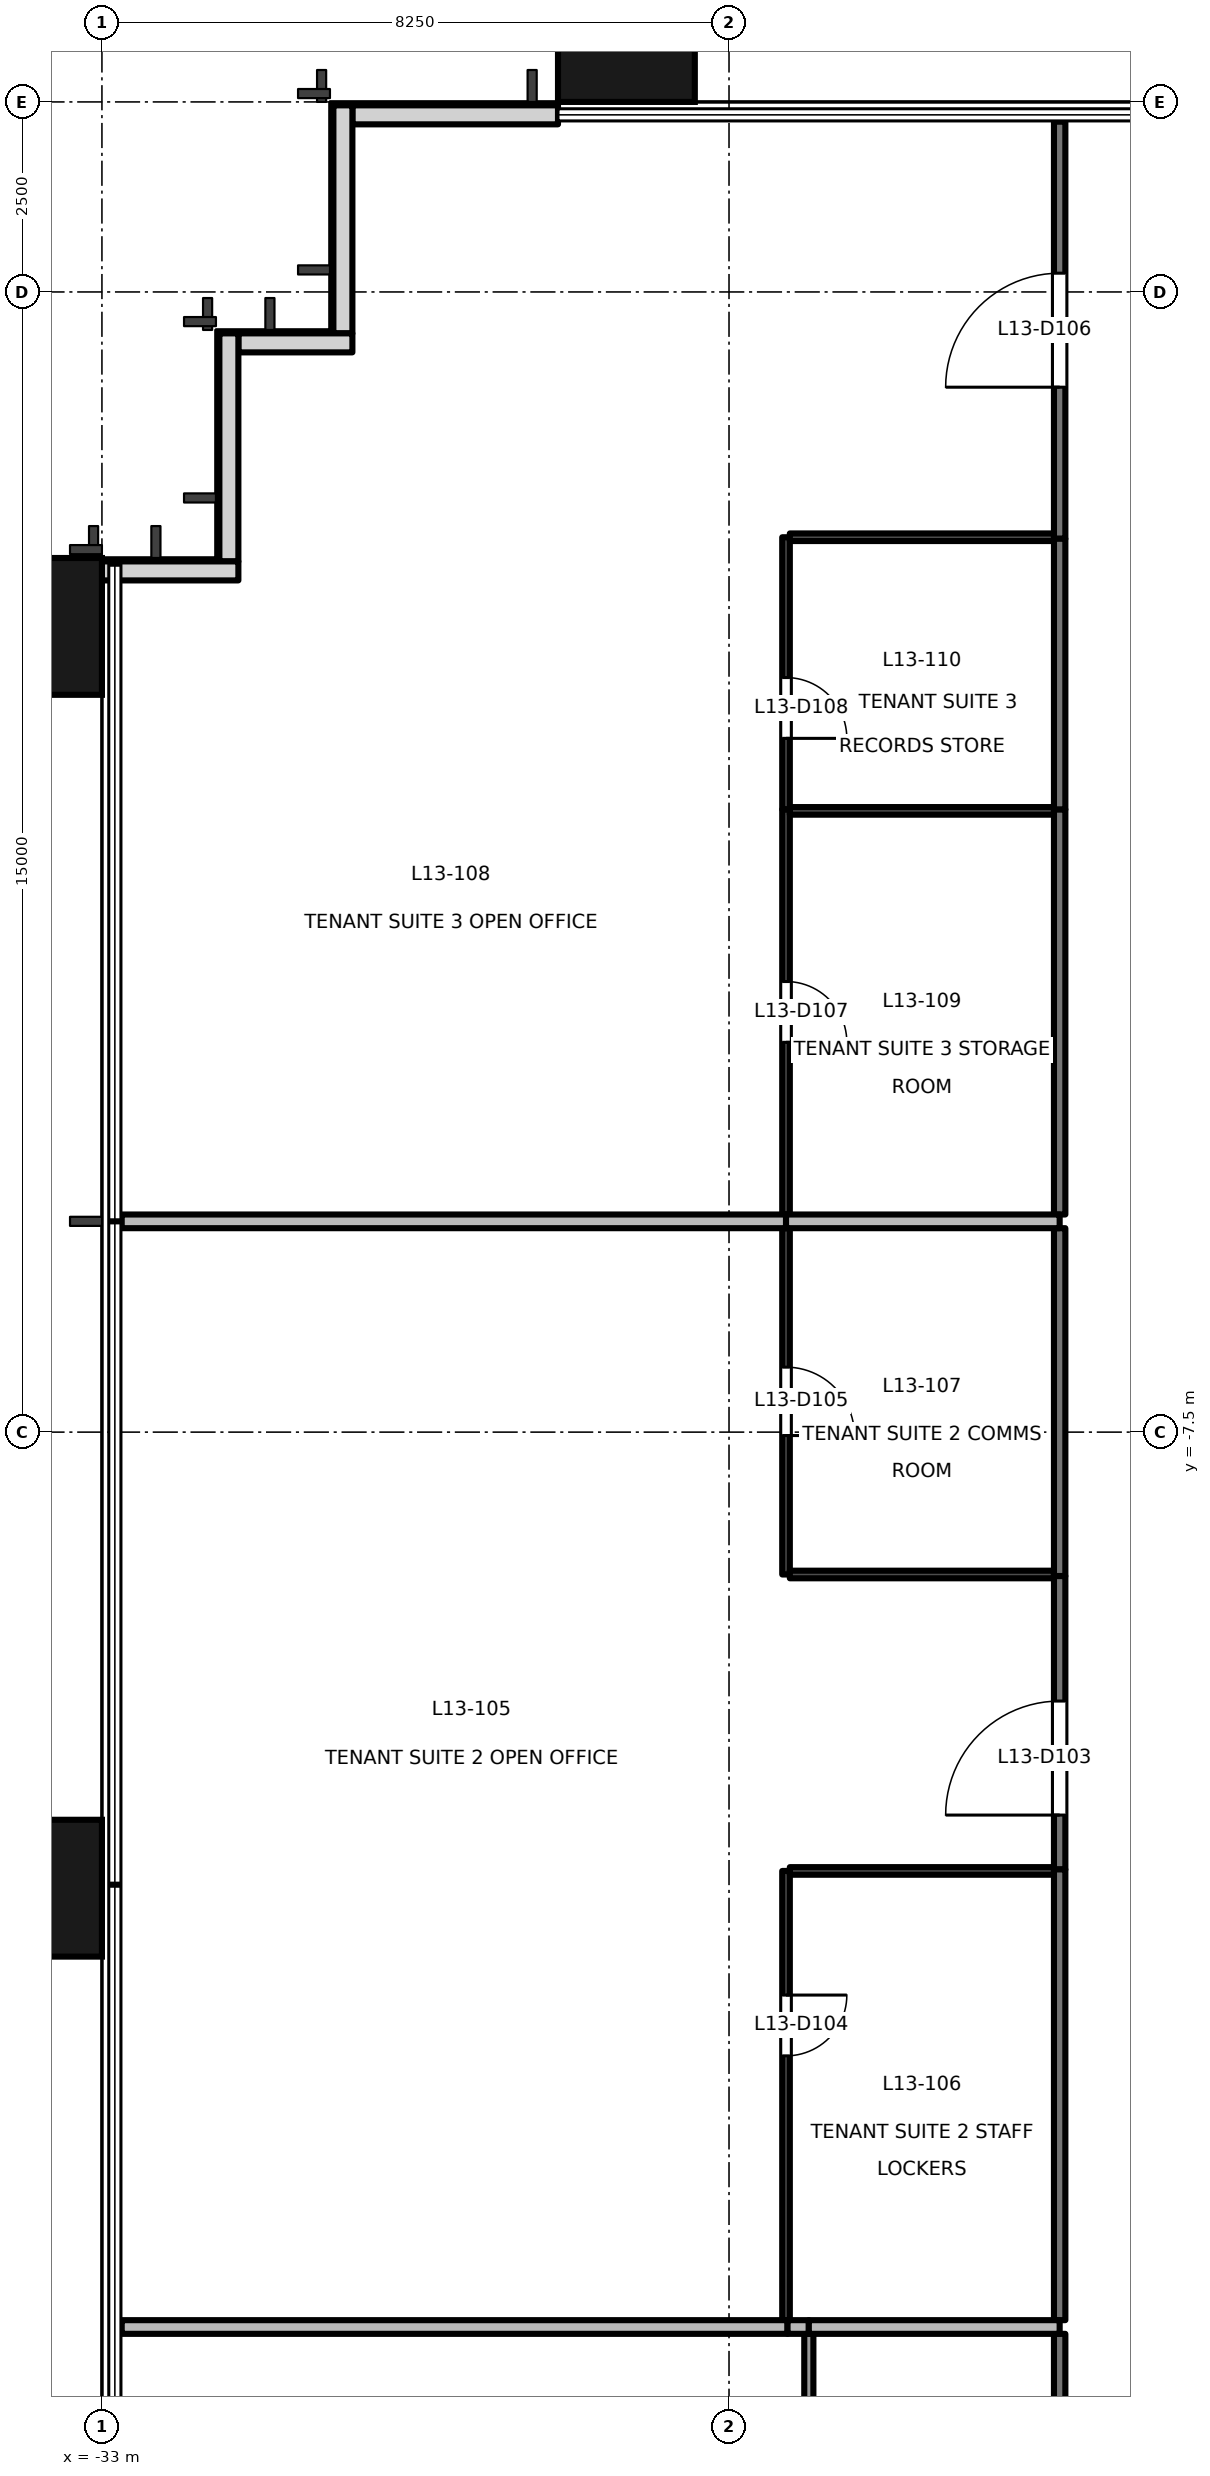
"""IFC4 building model, lengths in metres.
Left out: names, types, materials, properties, quantities, classifications, styles, units other than length and angle.
Written with IfcOpenShell. Run it as: python <this file> out.ifc"""

import sys

from ifc_helpers import new_model, si_unit, direction, frame, frame_2d, origin, origin_2d, place, context, subcontext, project, spatial, rectangle, extrude, element, fill, save


model = new_model("IFC4")
c1 = context("Model", 3, precision=1e-05, world=origin(), true_north=direction((0.0, 1.0)))
c2 = subcontext(c1, "Body", "Model", "MODEL_VIEW")
j1 = project(units=[si_unit("LENGTHUNIT", "METRE"), si_unit("PLANEANGLEUNIT", "RADIAN")], contexts=[c1])
p1 = place(None, origin())
s1 = spatial("IfcSite", under=j1, at=p1, CompositionType="ELEMENT")
p2 = place(p1, origin())
s2 = spatial("IfcBuilding", under=s1, at=p2, CompositionType="ELEMENT")
p3 = place(p2, frame((0.0, 0.0, 61.1)))
s3 = spatial("IfcBuildingStorey", under=s2, at=p3, CompositionType="ELEMENT", Elevation=61.1)
for number, where, z_axis, x_axis in (
    (1, (-33.9, -13.5, -0.2), (0.0, 0.0, 1.0), (0.0, 1.0, 0.0)),
    (2, (-33.9, 3.1, -0.2), (0.0, 0.0, 1.0), (0.0, 1.0, 0.0)),
    (3, (-26.1, 10.9, -0.2), (0.0, 0.0, 1.0), (1.0, 0.0, 0.0)),
):
    element("IfcColumn", number, at=place(p3, frame(where, z_axis=z_axis, x_axis=x_axis)), inside=s3, PredefinedType="COLUMN", context=c2, shape_type="SweptSolid", body=[
        extrude(rectangle(XDim=1.8, YDim=1.8, at=origin_2d()), origin(), (0.0, 0.0, 1.0), 4.1),
    ])
p4 = place(p3, frame((-27.0, 9.83, 0.0), z_axis=(0.0, 0.0, 1.0), x_axis=(-1.0, 0.0, 0.0)))
e4 = element("IfcWall", 4, at=p4, inside=s3, PredefinedType="SOLIDWALL", context=c2, shape_type="SweptSolid", body=[
    extrude(rectangle(XDim=2.705, YDim=0.25, at=frame_2d((1.353, 0.0))), origin(), (0.0, 0.0, 1.0), 3.9),
])
p5 = place(p3, frame((-29.83, 9.955, 0.0), z_axis=(0.0, 0.0, 1.0), x_axis=(0.0, -1.0, 0.0)))
e5 = element("IfcWall", 5, at=p5, inside=s3, PredefinedType="SOLIDWALL", context=c2, shape_type="SweptSolid", body=[
    extrude(rectangle(XDim=3.0, YDim=0.25, at=frame_2d((1.5, 0.0))), origin(), (0.0, 0.0, 1.0), 3.9),
])
p6 = place(p3, frame((-29.705, 6.83, 0.0), z_axis=(0.0, 0.0, 1.0), x_axis=(-1.0, 0.0, 0.0)))
e6 = element("IfcWall", 6, at=p6, inside=s3, PredefinedType="SOLIDWALL", context=c2, shape_type="SweptSolid", body=[
    extrude(rectangle(XDim=1.5, YDim=0.25, at=frame_2d((0.75, 0.0))), origin(), (0.0, 0.0, 1.0), 3.9),
])
p7 = place(p3, frame((-31.33, 6.955, 0.0), z_axis=(0.0, 0.0, 1.0), x_axis=(0.0, -1.0, 0.0)))
e7 = element("IfcWall", 7, at=p7, inside=s3, PredefinedType="SOLIDWALL", context=c2, shape_type="SweptSolid", body=[
    extrude(rectangle(XDim=3.0, YDim=0.25, at=frame_2d((1.5, 0.0))), origin(), (0.0, 0.0, 1.0), 3.9),
])
p8 = place(p3, frame((-31.205, 3.83, 0.0), z_axis=(0.0, 0.0, 1.0), x_axis=(-1.0, 0.0, 0.0)))
e8 = element("IfcWall", 8, at=p8, inside=s3, PredefinedType="SOLIDWALL", context=c2, shape_type="SweptSolid", body=[
    extrude(rectangle(XDim=1.8, YDim=0.25, at=frame_2d((0.9, 0.0))), origin(), (0.0, 0.0, 1.0), 3.9),
])
p9 = place(p3, frame((-20.4, -26.18, 0.0), z_axis=(0.0, 0.0, 1.0), x_axis=(0.0, 1.0, 0.0)))
e9 = element("IfcWall", 9, at=p9, inside=s3, PredefinedType="PARTITIONING", context=c2, shape_type="SweptSolid", body=[
    extrude(rectangle(XDim=6.817, YDim=0.15, at=frame_2d((3.408, 0.0))), origin(), (0.0, 0.0, 1.0), 3.3),
])
p10 = place(p3, frame((-20.4, -13.253, 0.0), z_axis=(0.0, 0.0, 1.0), x_axis=(0.0, 1.0, 0.0)))
e10 = element("IfcWall", 10, at=p10, inside=s3, PredefinedType="PARTITIONING", context=c2, shape_type="SweptSolid", body=[
    extrude(rectangle(XDim=3.86, YDim=0.15, at=frame_2d((1.93, 0.0))), origin(), (0.0, 0.0, 1.0), 3.9),
])
p11 = place(p10, frame((0.715, 0.0, 0.0)))
e11 = element("IfcOpeningElement", 11, at=p11, cuts=e10, PredefinedType="OPENING", context=c2, shape_type="SweptSolid", body=[
    extrude(rectangle(XDim=1.5, YDim=2.1, at=frame_2d((0.75, 1.05))), frame((0.0, 0.085, 0.0), z_axis=(0.0, -1.0, 0.0), x_axis=(1.0, 0.0, 0.0)), (0.0, 0.0, 1.0), 0.171),
])
p12 = place(p3, frame((-20.4, -19.183, 0.0), z_axis=(0.0, 0.0, 1.0), x_axis=(0.0, 1.0, 0.0)))
e12 = element("IfcWall", 12, at=p12, inside=s3, PredefinedType="PARTITIONING", context=c2, shape_type="SweptSolid", body=[
    extrude(rectangle(XDim=5.93, YDim=0.15, at=frame_2d((2.965, 0.0))), origin(), (0.0, 0.0, 1.0), 3.3),
])
p13 = place(p3, frame((-20.4, -9.393, 0.0), z_axis=(0.0, 0.0, 1.0), x_axis=(0.0, 1.0, 0.0)))
e13 = element("IfcWall", 13, at=p13, inside=s3, PredefinedType="PARTITIONING", context=c2, shape_type="SweptSolid", body=[
    extrude(rectangle(XDim=4.576, YDim=0.15, at=frame_2d((2.288, 0.0))), origin(), (0.0, 0.0, 1.0), 3.3),
])
p14 = place(p3, frame((-20.4, 4.253, 0.0), z_axis=(0.0, 0.0, 1.0), x_axis=(0.0, 1.0, 0.0)))
e14 = element("IfcWall", 14, at=p14, inside=s3, PredefinedType="PARTITIONING", context=c2, shape_type="SweptSolid", body=[
    extrude(rectangle(XDim=5.487, YDim=0.15, at=frame_2d((2.744, 0.0))), origin(), (0.0, 0.0, 1.0), 3.9),
])
p15 = place(p14, frame((1.994, 0.0, 0.0)))
e15 = element("IfcOpeningElement", 15, at=p15, cuts=e14, PredefinedType="OPENING", context=c2, shape_type="SweptSolid", body=[
    extrude(rectangle(XDim=1.5, YDim=2.1, at=frame_2d((0.75, 1.05))), frame((0.0, 0.085, 0.0), z_axis=(0.0, -1.0, 0.0), x_axis=(1.0, 0.0, 0.0)), (0.0, 0.0, 1.0), 0.171),
])
p16 = place(p3, frame((-20.4, -4.637, 0.0), z_axis=(0.0, 0.0, 1.0), x_axis=(0.0, 1.0, 0.0)))
e16 = element("IfcWall", 16, at=p16, inside=s3, PredefinedType="PARTITIONING", context=c2, shape_type="SweptSolid", body=[
    extrude(rectangle(XDim=5.33, YDim=0.15, at=frame_2d((2.665, 0.0))), origin(), (0.0, 0.0, 1.0), 3.3),
])
p17 = place(p3, frame((-20.4, 0.693, 0.0), z_axis=(0.0, 0.0, 1.0), x_axis=(0.0, 1.0, 0.0)))
e17 = element("IfcWall", 17, at=p17, inside=s3, PredefinedType="PARTITIONING", context=c2, shape_type="SweptSolid", body=[
    extrude(rectangle(XDim=3.56, YDim=0.15, at=frame_2d((1.78, 0.0))), origin(), (0.0, 0.0, 1.0), 3.9),
])
p18 = place(p3, frame((-23.7, -19.363, 0.0), z_axis=(0.0, 0.0, 1.0), x_axis=(0.0, -1.0, 0.0)))
e18 = element("IfcWall", 18, at=p18, inside=s3, PredefinedType="PARTITIONING", context=c2, shape_type="SweptSolid", body=[
    extrude(rectangle(XDim=6.797, YDim=0.12, at=frame_2d((3.398, 0.0))), origin(), (0.0, 0.0, 1.0), 3.3),
])
p19 = place(p18, frame((1.869, 0.0, 0.0)))
e19 = element("IfcOpeningElement", 19, at=p19, cuts=e18, PredefinedType="OPENING", context=c2, shape_type="SweptSolid", body=[
    extrude(rectangle(XDim=0.9, YDim=2.1, at=frame_2d((0.45, 1.05))), frame((0.0, 0.071, 0.0), z_axis=(0.0, -1.0, 0.0), x_axis=(1.0, 0.0, 0.0)), (0.0, 0.0, 1.0), 0.141),
])
p20 = place(p3, frame((-32.74, -19.273, 0.0), z_axis=(0.0, 0.0, 1.0), x_axis=(1.0, 0.0, 0.0)))
e20 = element("IfcWall", 20, at=p20, inside=s3, PredefinedType="PARTITIONING", context=c2, shape_type="SweptSolid", body=[
    extrude(rectangle(XDim=8.76, YDim=0.18, at=frame_2d((4.38, 0.0))), origin(), (0.0, 0.0, 1.0), 3.9),
])
p21 = place(p3, frame((-23.98, -19.273, 0.0), z_axis=(0.0, 0.0, 1.0), x_axis=(1.0, 0.0, 0.0)))
e21 = element("IfcWall", 21, at=p21, inside=s3, PredefinedType="PARTITIONING", context=c2, shape_type="SweptSolid", body=[
    extrude(rectangle(XDim=0.28, YDim=0.18, at=frame_2d((0.14, 0.0))), origin(), (0.0, 0.0, 1.0), 3.9),
])
p22 = place(p3, frame((-23.7, -19.273, 0.0), z_axis=(0.0, 0.0, 1.0), x_axis=(1.0, 0.0, 0.0)))
e22 = element("IfcWall", 22, at=p22, inside=s3, PredefinedType="PARTITIONING", context=c2, shape_type="SweptSolid", body=[
    extrude(rectangle(XDim=3.3, YDim=0.18, at=frame_2d((1.65, 0.0))), origin(), (0.0, 0.0, 1.0), 3.9),
])
p23 = place(p3, frame((-24.0, -13.273, 0.0), z_axis=(0.0, 0.0, 1.0), x_axis=(0.0, -1.0, 0.0)))
e23 = element("IfcWall", 23, at=p23, inside=s3, PredefinedType="PARTITIONING", context=c2, shape_type="SweptSolid", body=[
    extrude(rectangle(XDim=5.91, YDim=0.1, at=frame_2d((2.955, 0.0))), origin(), (0.0, 0.0, 1.0), 3.3),
])
p24 = place(p23, frame((1.633, 0.0, 0.0)))
e24 = element("IfcOpeningElement", 24, at=p24, cuts=e23, PredefinedType="OPENING", context=c2, shape_type="SweptSolid", body=[
    extrude(rectangle(XDim=0.8, YDim=2.1, at=frame_2d((0.4, 1.05))), frame((0.0, 0.061, 0.0), z_axis=(0.0, -1.0, 0.0), x_axis=(1.0, 0.0, 0.0)), (0.0, 0.0, 1.0), 0.121),
])
p25 = place(p3, frame((-20.475, -13.273, 0.0), z_axis=(0.0, 0.0, 1.0), x_axis=(-1.0, 0.0, 0.0)))
e25 = element("IfcWall", 25, at=p25, inside=s3, PredefinedType="PARTITIONING", context=c2, shape_type="SweptSolid", body=[
    extrude(rectangle(XDim=3.475, YDim=0.1, at=frame_2d((1.737, 0.0))), origin(), (0.0, 0.0, 1.0), 3.9),
])
p26 = place(p3, frame((-24.0, -4.817, 0.0), z_axis=(0.0, 0.0, 1.0), x_axis=(0.0, -1.0, 0.0)))
e26 = element("IfcWall", 26, at=p26, inside=s3, PredefinedType="PARTITIONING", context=c2, shape_type="SweptSolid", body=[
    extrude(rectangle(XDim=4.556, YDim=0.1, at=frame_2d((2.278, 0.0))), origin(), (0.0, 0.0, 1.0), 3.3),
])
p27 = place(p26, frame((1.828, 0.0, 0.0)))
e27 = element("IfcOpeningElement", 27, at=p27, cuts=e26, PredefinedType="OPENING", context=c2, shape_type="SweptSolid", body=[
    extrude(rectangle(XDim=0.9, YDim=2.1, at=frame_2d((0.45, 1.05))), frame((0.0, 0.061, 0.0), z_axis=(0.0, -1.0, 0.0), x_axis=(1.0, 0.0, 0.0)), (0.0, 0.0, 1.0), 0.121),
])
p28 = place(p3, frame((-23.95, -9.373, 0.0), z_axis=(0.0, 0.0, 1.0), x_axis=(1.0, 0.0, 0.0)))
e28 = element("IfcWall", 28, at=p28, inside=s3, PredefinedType="PARTITIONING", context=c2, shape_type="SweptSolid", body=[
    extrude(rectangle(XDim=3.475, YDim=0.1, at=frame_2d((1.737, 0.0))), origin(), (0.0, 0.0, 1.0), 3.9),
])
p29 = place(p3, frame((-32.74, -4.727, 0.0), z_axis=(0.0, 0.0, 1.0), x_axis=(1.0, 0.0, 0.0)))
e29 = element("IfcWall", 29, at=p29, inside=s3, PredefinedType="PARTITIONING", context=c2, shape_type="SweptSolid", body=[
    extrude(rectangle(XDim=8.74, YDim=0.18, at=frame_2d((4.37, 0.0))), origin(), (0.0, 0.0, 1.0), 3.3),
])
p30 = place(p3, frame((-24.0, -4.727, 0.0), z_axis=(0.0, 0.0, 1.0), x_axis=(1.0, 0.0, 0.0)))
e30 = element("IfcWall", 30, at=p30, inside=s3, PredefinedType="PARTITIONING", context=c2, shape_type="SweptSolid", body=[
    extrude(rectangle(XDim=3.6, YDim=0.18, at=frame_2d((1.8, 0.0))), origin(), (0.0, 0.0, 1.0), 3.3),
])
p31 = place(p3, frame((-24.0, 0.693, 0.0), z_axis=(0.0, 0.0, 1.0), x_axis=(0.0, -1.0, 0.0)))
e31 = element("IfcWall", 31, at=p31, inside=s3, PredefinedType="PARTITIONING", context=c2, shape_type="SweptSolid", body=[
    extrude(rectangle(XDim=5.33, YDim=0.1, at=frame_2d((2.665, 0.0))), origin(), (0.0, 0.0, 1.0), 3.3),
])
p32 = place(p31, frame((2.265, 0.0, 0.0)))
e32 = element("IfcOpeningElement", 32, at=p32, cuts=e31, PredefinedType="OPENING", context=c2, shape_type="SweptSolid", body=[
    extrude(rectangle(XDim=0.8, YDim=2.1, at=frame_2d((0.4, 1.05))), frame((0.0, 0.061, 0.0), z_axis=(0.0, -1.0, 0.0), x_axis=(1.0, 0.0, 0.0)), (0.0, 0.0, 1.0), 0.121),
])
p33 = place(p3, frame((-24.0, 4.273, 0.0), z_axis=(0.0, 0.0, 1.0), x_axis=(0.0, -1.0, 0.0)))
e33 = element("IfcWall", 33, at=p33, inside=s3, PredefinedType="PARTITIONING", context=c2, shape_type="SweptSolid", body=[
    extrude(rectangle(XDim=3.58, YDim=0.1, at=frame_2d((1.79, 0.0))), origin(), (0.0, 0.0, 1.0), 3.9),
])
p34 = place(p33, frame((1.846, 0.0, 0.0)))
e34 = element("IfcOpeningElement", 34, at=p34, cuts=e33, PredefinedType="OPENING", context=c2, shape_type="SweptSolid", body=[
    extrude(rectangle(XDim=0.8, YDim=2.1, at=frame_2d((0.4, 1.05))), frame((0.0, 0.061, 0.0), z_axis=(0.0, -1.0, 0.0), x_axis=(1.0, 0.0, 0.0)), (0.0, 0.0, 1.0), 0.121),
])
for number, where, z_axis, x_axis in (
    (35, (-20.475, 4.273, 0.0), (0.0, 0.0, 1.0), (-1.0, 0.0, 0.0)),
    (36, (-23.95, 0.673, 0.0), (0.0, 0.0, 1.0), (1.0, 0.0, 0.0)),
):
    element("IfcWall", number, at=place(p3, frame(where, z_axis=z_axis, x_axis=x_axis)), inside=s3, PredefinedType="PARTITIONING", context=c2, shape_type="SweptSolid", body=[
        extrude(rectangle(XDim=3.475, YDim=0.1, at=frame_2d((1.737, 0.0))), origin(), (0.0, 0.0, 1.0), 3.9),
    ])
p35 = place(p11, origin())
e37 = element("IfcDoor", 37, at=p35, inside=s3, OperationType="DOUBLE_DOOR_SINGLE_SWING", PredefinedType="DOOR", context=c2, shape_type="SweptSolid", body=[
    extrude(rectangle(XDim=1.5, YDim=2.1, at=frame_2d((0.75, 1.05))), frame((0.0, 0.025, 0.0), z_axis=(0.0, -1.0, 0.0), x_axis=(1.0, 0.0, 0.0)), (0.0, 0.0, 1.0), 0.05),
])
fill(e11, e37)
p36 = place(p24, origin())
e38 = element("IfcDoor", 38, at=p36, inside=s3, OperationType="SINGLE_SWING_LEFT", PredefinedType="DOOR", context=c2, shape_type="SweptSolid", body=[
    extrude(rectangle(XDim=0.8, YDim=2.1, at=frame_2d((0.4, 1.05))), frame((0.0, 0.025, 0.0), z_axis=(0.0, -1.0, 0.0), x_axis=(1.0, 0.0, 0.0)), (0.0, 0.0, 1.0), 0.05),
])
fill(e24, e38)
p37 = place(p27, origin())
e39 = element("IfcDoor", 39, at=p37, inside=s3, OperationType="SINGLE_SWING_RIGHT", PredefinedType="DOOR", context=c2, shape_type="SweptSolid", body=[
    extrude(rectangle(XDim=0.9, YDim=2.1, at=frame_2d((0.45, 1.05))), frame((0.0, 0.025, 0.0), z_axis=(0.0, -1.0, 0.0), x_axis=(1.0, 0.0, 0.0)), (0.0, 0.0, 1.0), 0.05),
])
fill(e27, e39)
p38 = place(p15, origin())
e40 = element("IfcDoor", 40, at=p38, inside=s3, OperationType="DOUBLE_DOOR_SINGLE_SWING", PredefinedType="DOOR", context=c2, shape_type="SweptSolid", body=[
    extrude(rectangle(XDim=1.5, YDim=2.1, at=frame_2d((0.75, 1.05))), frame((0.0, 0.025, 0.0), z_axis=(0.0, -1.0, 0.0), x_axis=(1.0, 0.0, 0.0)), (0.0, 0.0, 1.0), 0.05),
])
fill(e15, e40)
p39 = place(p32, origin())
e41 = element("IfcDoor", 41, at=p39, inside=s3, OperationType="SINGLE_SWING_RIGHT", PredefinedType="DOOR", context=c2, shape_type="SweptSolid", body=[
    extrude(rectangle(XDim=0.8, YDim=2.1, at=frame_2d((0.4, 1.05))), frame((0.0, 0.025, 0.0), z_axis=(0.0, -1.0, 0.0), x_axis=(1.0, 0.0, 0.0)), (0.0, 0.0, 1.0), 0.05),
])
fill(e32, e41)
p40 = place(p34, origin())
e42 = element("IfcDoor", 42, at=p40, inside=s3, OperationType="SINGLE_SWING_RIGHT", PredefinedType="DOOR", context=c2, shape_type="SweptSolid", body=[
    extrude(rectangle(XDim=0.8, YDim=2.1, at=frame_2d((0.4, 1.05))), frame((0.0, 0.025, 0.0), z_axis=(0.0, -1.0, 0.0), x_axis=(1.0, 0.0, 0.0)), (0.0, 0.0, 1.0), 0.05),
])
fill(e34, e42)
save(model, sys.argv[1])
